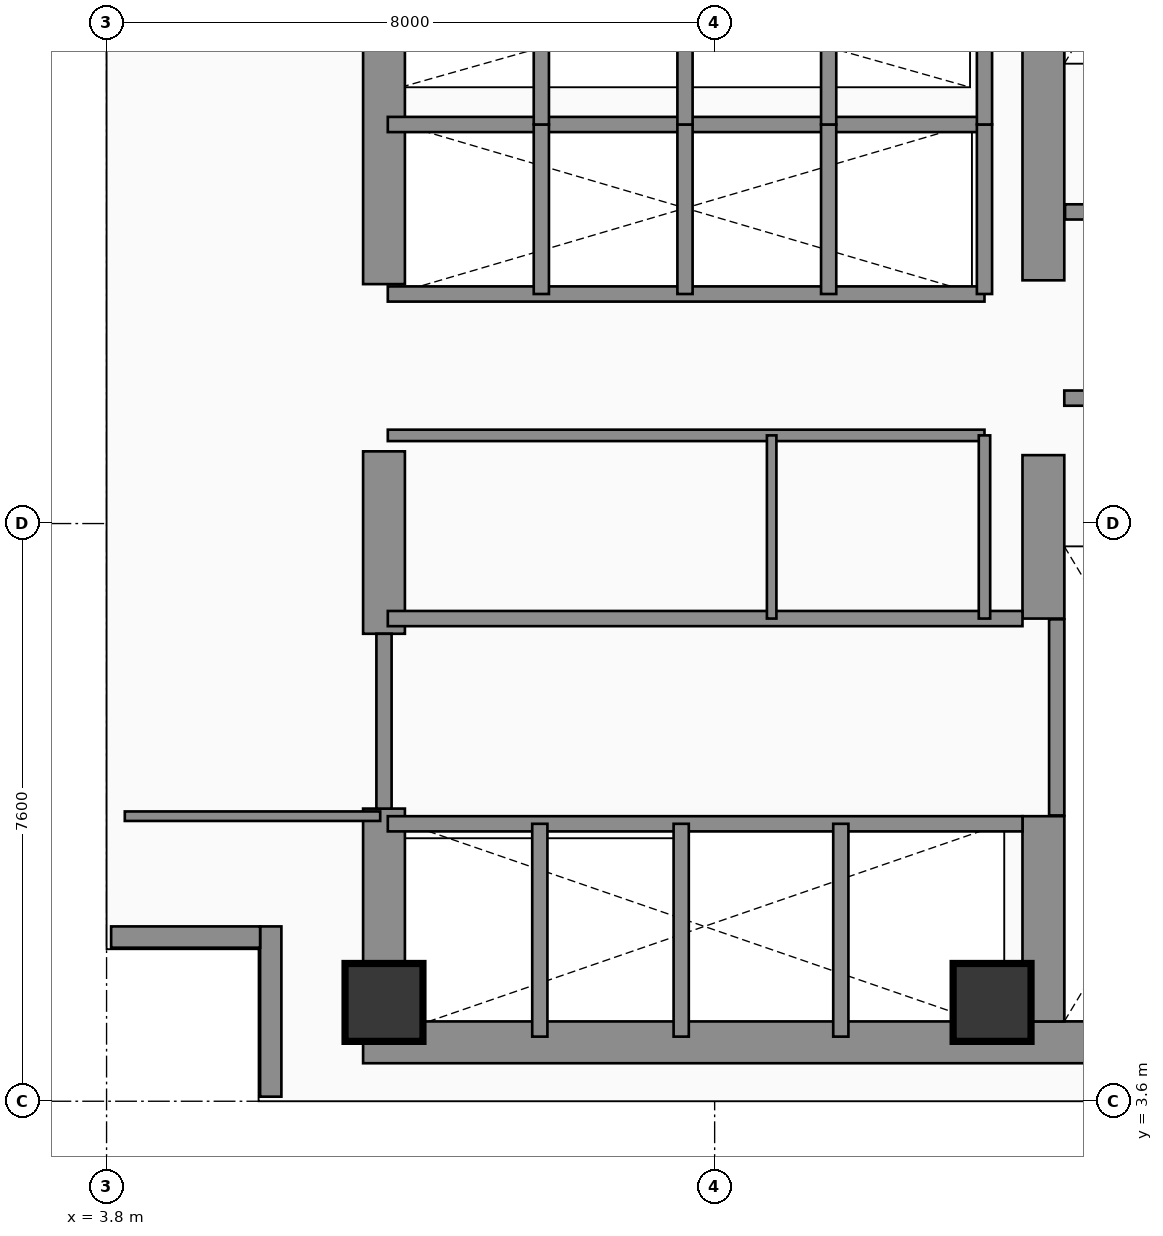
"""IFC4 building model, lengths in metres.
Left out: names, types, materials, properties, quantities, classifications, styles, units other than length and angle.
Written with IfcOpenShell. Run it as: python <this file> out.ifc"""

import sys

from ifc_helpers import new_model, si_unit, direction, frame, frame_2d, origin, origin_2d, place, context, subcontext, project, spatial, rectangle, extrude, element, fill, save


model = new_model("IFC4")
c1 = context("Model", 3, precision=1e-05, world=origin(), true_north=direction((0.0, 1.0)))
c2 = subcontext(c1, "Body", "Model", "MODEL_VIEW")
j1 = project(units=[si_unit("LENGTHUNIT", "METRE"), si_unit("PLANEANGLEUNIT", "RADIAN")], contexts=[c1])
p1 = place(None, origin())
s1 = spatial("IfcSite", under=j1, at=p1, CompositionType="ELEMENT")
p2 = place(p1, origin())
s2 = spatial("IfcBuilding", under=s1, at=p2, CompositionType="ELEMENT")
p3 = place(p2, frame((0.0, 0.0, 223.5)))
s3 = spatial("IfcBuildingStorey", under=s2, at=p3, CompositionType="ELEMENT", Elevation=223.5)
p4 = place(p3, frame((7.175, 4.375, 0.0), z_axis=(0.0, 0.0, 1.0), x_axis=(1.0, 0.0, 0.0)))
e1 = element("IfcWall", 1, at=p4, inside=s3, PredefinedType="SHEAR", context=c2, shape_type="SweptSolid", body=[
    extrude(rectangle(XDim=13.9, YDim=0.55, at=frame_2d((6.95, 0.0))), origin(), (0.0, 0.0, 1.0), 3.56),
])
p5 = place(p3, frame((7.45, 4.65, 0.0), z_axis=(0.0, 0.0, 1.0), x_axis=(0.0, 1.0, 0.0)))
e2 = element("IfcWall", 2, at=p5, inside=s3, PredefinedType="SHEAR", context=c2, shape_type="SweptSolid", body=[
    extrude(rectangle(XDim=2.8, YDim=0.55, at=frame_2d((1.4, 0.0))), origin(), (0.0, 0.0, 1.0), 3.56),
])
p6 = place(p3, frame((7.45, 9.75, 0.0), z_axis=(0.0, 0.0, 1.0), x_axis=(0.0, 1.0, 0.0)))
e3 = element("IfcWall", 3, at=p6, inside=s3, PredefinedType="SHEAR", context=c2, shape_type="SweptSolid", body=[
    extrude(rectangle(XDim=2.4, YDim=0.55, at=frame_2d((1.2, 0.0))), origin(), (0.0, 0.0, 1.0), 3.56),
])
p7 = place(p3, frame((7.45, 14.35, 0.0), z_axis=(0.0, 0.0, 1.0), x_axis=(0.0, 1.0, 0.0)))
e4 = element("IfcWall", 4, at=p7, inside=s3, PredefinedType="SHEAR", context=c2, shape_type="SweptSolid", body=[
    extrude(rectangle(XDim=4.81, YDim=0.55, at=frame_2d((2.405, 0.0))), origin(), (0.0, 0.0, 1.0), 3.56),
])
p8 = place(p3, frame((16.125, 4.65, 0.0), z_axis=(0.0, 0.0, 1.0), x_axis=(0.0, 1.0, 0.0)))
e5 = element("IfcWall", 5, at=p8, inside=s3, PredefinedType="SHEAR", context=c2, shape_type="SweptSolid", body=[
    extrude(rectangle(XDim=2.7, YDim=0.55, at=frame_2d((1.35, 0.0))), origin(), (0.0, 0.0, 1.0), 3.56),
])
p9 = place(p3, frame((16.125, 9.95, 0.0), z_axis=(0.0, 0.0, 1.0), x_axis=(0.0, 1.0, 0.0)))
e6 = element("IfcWall", 6, at=p9, inside=s3, PredefinedType="SHEAR", context=c2, shape_type="SweptSolid", body=[
    extrude(rectangle(XDim=2.15, YDim=0.55, at=frame_2d((1.075, 0.0))), origin(), (0.0, 0.0, 1.0), 3.56),
])
p10 = place(p3, frame((16.125, 14.4, 0.0), z_axis=(0.0, 0.0, 1.0), x_axis=(0.0, 1.0, 0.0)))
e7 = element("IfcWall", 7, at=p10, inside=s3, PredefinedType="SHEAR", context=c2, shape_type="SweptSolid", body=[
    extrude(rectangle(XDim=9.1, YDim=0.55, at=frame_2d((4.55, 0.0))), origin(), (0.0, 0.0, 1.0), 3.56),
])
for number, where, z_axis, x_axis in (
    (8, (7.45, 4.9, 0.0), (0.0, 0.0, 1.0), (1.0, 0.0, 0.0)),
    (9, (15.45, 4.9, 0.0), (0.0, 0.0, 1.0), (1.0, 0.0, 0.0)),
):
    element("IfcColumn", number, at=place(p3, frame(where, z_axis=z_axis, x_axis=x_axis)), inside=s3, PredefinedType="COLUMN", context=c2, shape_type="SweptSolid", body=[
        extrude(rectangle(XDim=1.0, YDim=1.0, at=origin_2d()), origin(), (0.0, 0.0, 1.0), 3.56),
    ])
p11 = place(p3, frame((5.96, 3.66, 0.0), z_axis=(0.0, 0.0, 1.0), x_axis=(0.0, 1.0, 0.0)))
e10 = element("IfcWall", 10, at=p11, inside=s3, PredefinedType="SOLIDWALL", context=c2, shape_type="SweptSolid", body=[
    extrude(rectangle(XDim=2.24, YDim=0.28, at=frame_2d((1.12, 0.0))), origin(), (0.0, 0.0, 1.0), 3.56),
])
p12 = place(p3, frame((3.86, 5.76, 0.0), z_axis=(0.0, 0.0, 1.0), x_axis=(1.0, 0.0, 0.0)))
e11 = element("IfcWall", 11, at=p12, inside=s3, PredefinedType="SOLIDWALL", context=c2, shape_type="SweptSolid", body=[
    extrude(rectangle(XDim=1.96, YDim=0.28, at=frame_2d((0.98, 0.0))), origin(), (0.0, 0.0, 1.0), 3.56),
])
p13 = place(p3, frame((16.3, 7.36, 0.0), z_axis=(0.0, 0.0, 1.0), x_axis=(0.0, 1.0, 0.0)))
e12 = element("IfcWall", 12, at=p13, inside=s3, PredefinedType="SHEAR", context=c2, shape_type="SweptSolid", body=[
    extrude(rectangle(XDim=2.58, YDim=0.2, at=frame_2d((1.29, 0.0))), origin(), (0.0, 0.0, 1.0), 3.56),
])
p14 = place(p3, frame((16.4, 12.85, 0.0), z_axis=(0.0, 0.0, 1.0), x_axis=(1.0, 0.0, 0.0)))
e13 = element("IfcWall", 13, at=p14, inside=s3, PredefinedType="PARTITIONING", context=c2, shape_type="SweptSolid", body=[
    extrude(rectangle(XDim=3.96, YDim=0.2, at=frame_2d((1.98, 0.0))), origin(), (0.0, 0.0, 1.0), 3.56),
])
p15 = place(p14, frame((1.304, 0.0, 0.0)))
e14 = element("IfcOpeningElement", 14, at=p15, cuts=e13, PredefinedType="OPENING", context=c2, shape_type="SweptSolid", body=[
    extrude(rectangle(XDim=1.1, YDim=2.2, at=frame_2d((0.55, 1.1))), frame((0.0, 0.11, 0.0), z_axis=(0.0, -1.0, 0.0), x_axis=(1.0, 0.0, 0.0)), (0.0, 0.0, 1.0), 0.22),
])
p16 = place(p3, frame((16.41, 15.3, 0.0), z_axis=(0.0, 0.0, 1.0), x_axis=(1.0, 0.0, 0.0)))
e15 = element("IfcWall", 15, at=p16, inside=s3, PredefinedType="PARTITIONING", context=c2, shape_type="SweptSolid", body=[
    extrude(rectangle(XDim=3.95, YDim=0.2, at=frame_2d((1.975, 0.0))), origin(), (0.0, 0.0, 1.0), 3.56),
])
p17 = place(p16, frame((1.294, 0.0, 0.0)))
e16 = element("IfcOpeningElement", 16, at=p17, cuts=e15, PredefinedType="OPENING", context=c2, shape_type="SweptSolid", body=[
    extrude(rectangle(XDim=1.1, YDim=2.2, at=frame_2d((0.55, 1.1))), frame((0.0, 0.11, 0.0), z_axis=(0.0, -1.0, 0.0), x_axis=(1.0, 0.0, 0.0)), (0.0, 0.0, 1.0), 0.22),
])
p18 = place(p3, frame((7.5, 7.25, 0.0), z_axis=(0.0, 0.0, 1.0), x_axis=(1.0, 0.0, 0.0)))
e17 = element("IfcWall", 17, at=p18, inside=s3, PredefinedType="PARTITIONING", context=c2, shape_type="SweptSolid", body=[
    extrude(rectangle(XDim=8.35, YDim=0.2, at=frame_2d((4.175, 0.0))), origin(), (0.0, 0.0, 1.0), 3.56),
])
p19 = place(p18, frame((0.53, 0.0, 0.0)))
e18 = element("IfcOpeningElement", 18, at=p19, cuts=e17, PredefinedType="OPENING", context=c2, shape_type="SweptSolid", body=[
    extrude(rectangle(XDim=1.1, YDim=2.2, at=frame_2d((0.55, 1.1))), frame((0.0, 0.11, 0.0), z_axis=(0.0, -1.0, 0.0), x_axis=(1.0, 0.0, 0.0)), (0.0, 0.0, 1.0), 0.22),
])
p20 = place(p18, frame((2.37, 0.0, 0.0)))
e19 = element("IfcOpeningElement", 19, at=p20, cuts=e17, PredefinedType="OPENING", context=c2, shape_type="SweptSolid", body=[
    extrude(rectangle(XDim=1.1, YDim=2.2, at=frame_2d((0.55, 1.1))), frame((0.0, 0.11, 0.0), z_axis=(0.0, -1.0, 0.0), x_axis=(1.0, 0.0, 0.0)), (0.0, 0.0, 1.0), 0.22),
])
p21 = place(p18, frame((4.33, 0.0, 0.0)))
e20 = element("IfcOpeningElement", 20, at=p21, cuts=e17, PredefinedType="OPENING", context=c2, shape_type="SweptSolid", body=[
    extrude(rectangle(XDim=1.1, YDim=2.2, at=frame_2d((0.55, 1.1))), frame((0.0, 0.11, 0.0), z_axis=(0.0, -1.0, 0.0), x_axis=(1.0, 0.0, 0.0)), (0.0, 0.0, 1.0), 0.22),
])
p22 = place(p18, frame((6.5, 0.0, 0.0)))
e21 = element("IfcOpeningElement", 21, at=p22, cuts=e17, PredefinedType="OPENING", context=c2, shape_type="SweptSolid", body=[
    extrude(rectangle(XDim=1.1, YDim=2.2, at=frame_2d((0.55, 1.1))), frame((0.0, 0.11, 0.0), z_axis=(0.0, -1.0, 0.0), x_axis=(1.0, 0.0, 0.0)), (0.0, 0.0, 1.0), 0.22),
])
p23 = place(p3, frame((7.5, 9.95, 0.0), z_axis=(0.0, 0.0, 1.0), x_axis=(1.0, 0.0, 0.0)))
e22 = element("IfcWall", 22, at=p23, inside=s3, PredefinedType="PARTITIONING", context=c2, shape_type="SweptSolid", body=[
    extrude(rectangle(XDim=8.35, YDim=0.2, at=frame_2d((4.175, 0.0))), origin(), (0.0, 0.0, 1.0), 3.56),
])
for number, where, z_axis, x_axis in (
    (23, (9.5, 4.45, 0.0), (0.0, 0.0, 1.0), (0.0, 1.0, 0.0)),
    (24, (11.36, 4.45, 0.0), (0.0, 0.0, 1.0), (0.0, 1.0, 0.0)),
    (25, (13.46, 4.45, 0.0), (0.0, 0.0, 1.0), (0.0, 1.0, 0.0)),
):
    element("IfcWall", number, at=place(p3, frame(where, z_axis=z_axis, x_axis=x_axis)), inside=s3, PredefinedType="PARTITIONING", context=c2, shape_type="SweptSolid", body=[
        extrude(rectangle(XDim=2.8, YDim=0.2, at=frame_2d((1.4, 0.0))), origin(), (0.0, 0.0, 1.0), 3.56),
    ])
p24 = place(p3, frame((7.45, 7.45, 0.0), z_axis=(0.0, 0.0, 1.0), x_axis=(0.0, 1.0, 0.0)))
e26 = element("IfcWall", 26, at=p24, inside=s3, PredefinedType="PARTITIONING", context=c2, shape_type="SweptSolid", body=[
    extrude(rectangle(XDim=2.3, YDim=0.2, at=frame_2d((1.15, 0.0))), origin(), (0.0, 0.0, 1.0), 2.54),
])
p25 = place(p24, frame((0.633, 0.0, 0.0)))
e27 = element("IfcOpeningElement", 27, at=p25, cuts=e26, PredefinedType="OPENING", context=c2, shape_type="SweptSolid", body=[
    extrude(rectangle(XDim=1.2, YDim=2.25, at=frame_2d((0.6, 1.125))), frame((0.0, 0.11, 0.0), z_axis=(0.0, -1.0, 0.0), x_axis=(1.0, 0.0, 0.0)), (0.0, 0.0, 1.0), 0.22),
])
p26 = place(p3, frame((7.5, 12.36, 0.0), z_axis=(0.0, 0.0, 1.0), x_axis=(1.0, 0.0, 0.0)))
e28 = element("IfcWall", 28, at=p26, inside=s3, PredefinedType="PARTITIONING", context=c2, shape_type="SweptSolid", body=[
    extrude(rectangle(XDim=7.85, YDim=0.15, at=frame_2d((3.925, 0.0))), origin(), (0.0, 0.0, 1.0), 3.56),
])
p27 = place(p26, frame((2.202, 0.0, 0.0)))
e29 = element("IfcOpeningElement", 29, at=p27, cuts=e28, PredefinedType="OPENING", context=c2, shape_type="SweptSolid", body=[
    extrude(rectangle(XDim=0.85, YDim=2.15, at=frame_2d((0.425, 1.075))), frame((0.0, 0.085, 0.0), z_axis=(0.0, -1.0, 0.0), x_axis=(1.0, 0.0, 0.0)), (0.0, 0.0, 1.0), 0.17),
])
p28 = place(p26, frame((6.025, 0.0, 0.0)))
e30 = element("IfcOpeningElement", 30, at=p28, cuts=e28, PredefinedType="OPENING", context=c2, shape_type="SweptSolid", body=[
    extrude(rectangle(XDim=0.85, YDim=2.15, at=frame_2d((0.425, 1.075))), frame((0.0, 0.085, 0.0), z_axis=(0.0, -1.0, 0.0), x_axis=(1.0, 0.0, 0.0)), (0.0, 0.0, 1.0), 0.17),
])
p29 = place(p3, frame((15.35, 9.95, 0.0), z_axis=(0.0, 0.0, 1.0), x_axis=(0.0, 1.0, 0.0)))
e31 = element("IfcWall", 31, at=p29, inside=s3, PredefinedType="PARTITIONING", context=c2, shape_type="SweptSolid", body=[
    extrude(rectangle(XDim=2.41, YDim=0.15, at=frame_2d((1.205, 0.0))), origin(), (0.0, 0.0, 1.0), 3.56),
])
p30 = place(p3, frame((12.55, 9.95, 0.0), z_axis=(0.0, 0.0, 1.0), x_axis=(0.0, 1.0, 0.0)))
e32 = element("IfcWall", 32, at=p30, inside=s3, PredefinedType="PARTITIONING", context=c2, shape_type="SweptSolid", body=[
    extrude(rectangle(XDim=2.41, YDim=0.125, at=frame_2d((1.205, 0.0))), origin(), (0.0, 0.0, 1.0), 3.56),
])
p31 = place(p3, frame((7.5, 14.22, 0.0), z_axis=(0.0, 0.0, 1.0), x_axis=(1.0, 0.0, 0.0)))
e33 = element("IfcWall", 33, at=p31, inside=s3, PredefinedType="PARTITIONING", context=c2, shape_type="SweptSolid", body=[
    extrude(rectangle(XDim=7.85, YDim=0.2, at=frame_2d((3.925, 0.0))), origin(), (0.0, 0.0, 1.0), 3.56),
])
p32 = place(p31, frame((0.53, 0.0, 0.0)))
e34 = element("IfcOpeningElement", 34, at=p32, cuts=e33, PredefinedType="OPENING", context=c2, shape_type="SweptSolid", body=[
    extrude(rectangle(XDim=1.1, YDim=2.2, at=frame_2d((0.55, 1.1))), frame((0.0, 0.11, 0.0), z_axis=(0.0, -1.0, 0.0), x_axis=(1.0, 0.0, 0.0)), (0.0, 0.0, 1.0), 0.22),
])
p33 = place(p31, frame((2.42, 0.0, 0.0)))
e35 = element("IfcOpeningElement", 35, at=p33, cuts=e33, PredefinedType="OPENING", context=c2, shape_type="SweptSolid", body=[
    extrude(rectangle(XDim=1.1, YDim=2.2, at=frame_2d((0.55, 1.1))), frame((0.0, 0.11, 0.0), z_axis=(0.0, -1.0, 0.0), x_axis=(1.0, 0.0, 0.0)), (0.0, 0.0, 1.0), 0.22),
])
p34 = place(p31, frame((4.31, 0.0, 0.0)))
e36 = element("IfcOpeningElement", 36, at=p34, cuts=e33, PredefinedType="OPENING", context=c2, shape_type="SweptSolid", body=[
    extrude(rectangle(XDim=1.1, YDim=2.2, at=frame_2d((0.55, 1.1))), frame((0.0, 0.11, 0.0), z_axis=(0.0, -1.0, 0.0), x_axis=(1.0, 0.0, 0.0)), (0.0, 0.0, 1.0), 0.22),
])
p35 = place(p31, frame((6.2, 0.0, 0.0)))
e37 = element("IfcOpeningElement", 37, at=p35, cuts=e33, PredefinedType="OPENING", context=c2, shape_type="SweptSolid", body=[
    extrude(rectangle(XDim=1.1, YDim=2.2, at=frame_2d((0.55, 1.1))), frame((0.0, 0.11, 0.0), z_axis=(0.0, -1.0, 0.0), x_axis=(1.0, 0.0, 0.0)), (0.0, 0.0, 1.0), 0.22),
])
p36 = place(p3, frame((7.5, 16.45, 0.0), z_axis=(0.0, 0.0, 1.0), x_axis=(1.0, 0.0, 0.0)))
e38 = element("IfcWall", 38, at=p36, inside=s3, PredefinedType="PARTITIONING", context=c2, shape_type="SweptSolid", body=[
    extrude(rectangle(XDim=7.85, YDim=0.2, at=frame_2d((3.925, 0.0))), origin(), (0.0, 0.0, 1.0), 3.56),
])
for number, where, z_axis, x_axis in (
    (39, (15.35, 14.22, 0.0), (0.0, 0.0, 1.0), (0.0, 1.0, 0.0)),
    (40, (9.52, 14.22, 0.0), (0.0, 0.0, 1.0), (0.0, 1.0, 0.0)),
    (41, (11.41, 14.22, 0.0), (0.0, 0.0, 1.0), (0.0, 1.0, 0.0)),
    (42, (13.3, 14.22, 0.0), (0.0, 0.0, 1.0), (0.0, 1.0, 0.0)),
):
    element("IfcWall", number, at=place(p3, frame(where, z_axis=z_axis, x_axis=x_axis)), inside=s3, PredefinedType="PARTITIONING", context=c2, shape_type="SweptSolid", body=[
        extrude(rectangle(XDim=2.23, YDim=0.2, at=frame_2d((1.115, 0.0))), origin(), (0.0, 0.0, 1.0), 3.56),
    ])
for number, where, z_axis, x_axis in (
    (43, (15.35, 16.45, 0.0), (0.0, 0.0, 1.0), (0.0, 1.0, 0.0)),
    (44, (9.52, 16.45, 0.0), (0.0, 0.0, 1.0), (0.0, 1.0, 0.0)),
    (45, (11.41, 16.45, 0.0), (0.0, 0.0, 1.0), (0.0, 1.0, 0.0)),
    (46, (13.3, 16.45, 0.0), (0.0, 0.0, 1.0), (0.0, 1.0, 0.0)),
):
    element("IfcWall", number, at=place(p3, frame(where, z_axis=z_axis, x_axis=x_axis)), inside=s3, PredefinedType="PARTITIONING", context=c2, shape_type="SweptSolid", body=[
        extrude(rectangle(XDim=2.67, YDim=0.2, at=frame_2d((1.335, 0.0))), origin(), (0.0, 0.0, 1.0), 3.56),
    ])
p37 = place(p3, frame((4.04, 7.35, 0.0), z_axis=(0.0, 0.0, 1.0), x_axis=(1.0, 0.0, 0.0)))
e47 = element("IfcWall", 47, at=p37, inside=s3, PredefinedType="PARTITIONING", context=c2, shape_type="SweptSolid", body=[
    extrude(rectangle(XDim=3.36, YDim=0.125, at=frame_2d((1.68, 0.0))), origin(), (0.0, 0.0, 1.0), 3.56),
])
p38 = place(p37, frame((1.687, 0.0, 0.0)))
e48 = element("IfcOpeningElement", 48, at=p38, cuts=e47, PredefinedType="OPENING", context=c2, shape_type="SweptSolid", body=[
    extrude(rectangle(XDim=0.85, YDim=2.15, at=frame_2d((0.425, 1.075))), frame((0.0, 0.073, 0.0), z_axis=(0.0, -1.0, 0.0), x_axis=(1.0, 0.0, 0.0)), (0.0, 0.0, 1.0), 0.145),
])
p39 = place(p19, origin())
e49 = element("IfcDoor", 49, at=p39, inside=s3, OperationType="SLIDING_TO_LEFT", PredefinedType="DOOR", context=c2, shape_type="SweptSolid", body=[
    extrude(rectangle(XDim=1.1, YDim=2.2, at=frame_2d((0.55, 1.1))), frame((0.0, 0.025, 0.0), z_axis=(0.0, -1.0, 0.0), x_axis=(1.0, 0.0, 0.0)), (0.0, 0.0, 1.0), 0.05),
])
fill(e18, e49)
p40 = place(p20, origin())
e50 = element("IfcDoor", 50, at=p40, inside=s3, OperationType="SLIDING_TO_LEFT", PredefinedType="DOOR", context=c2, shape_type="SweptSolid", body=[
    extrude(rectangle(XDim=1.1, YDim=2.2, at=frame_2d((0.55, 1.1))), frame((0.0, 0.025, 0.0), z_axis=(0.0, -1.0, 0.0), x_axis=(1.0, 0.0, 0.0)), (0.0, 0.0, 1.0), 0.05),
])
fill(e19, e50)
p41 = place(p21, origin())
e51 = element("IfcDoor", 51, at=p41, inside=s3, OperationType="SLIDING_TO_LEFT", PredefinedType="DOOR", context=c2, shape_type="SweptSolid", body=[
    extrude(rectangle(XDim=1.1, YDim=2.2, at=frame_2d((0.55, 1.1))), frame((0.0, 0.025, 0.0), z_axis=(0.0, -1.0, 0.0), x_axis=(1.0, 0.0, 0.0)), (0.0, 0.0, 1.0), 0.05),
])
fill(e20, e51)
p42 = place(p22, origin())
e52 = element("IfcDoor", 52, at=p42, inside=s3, OperationType="SLIDING_TO_LEFT", PredefinedType="DOOR", context=c2, shape_type="SweptSolid", body=[
    extrude(rectangle(XDim=1.1, YDim=2.2, at=frame_2d((0.55, 1.1))), frame((0.0, 0.025, 0.0), z_axis=(0.0, -1.0, 0.0), x_axis=(1.0, 0.0, 0.0)), (0.0, 0.0, 1.0), 0.05),
])
fill(e21, e52)
p43 = place(p25, frame((1.2, 0.0, 0.0), z_axis=(0.0, 0.0, 1.0), x_axis=(-1.0, 0.0, 0.0)))
e53 = element("IfcDoor", 53, at=p43, inside=s3, OperationType="SINGLE_SWING_RIGHT", PredefinedType="DOOR", context=c2, shape_type="SweptSolid", body=[
    extrude(rectangle(XDim=1.2, YDim=2.25, at=frame_2d((0.6, 1.125))), frame((0.0, 0.025, 0.0), z_axis=(0.0, -1.0, 0.0), x_axis=(1.0, 0.0, 0.0)), (0.0, 0.0, 1.0), 0.05),
])
fill(e27, e53)
p44 = place(p27, origin())
e54 = element("IfcDoor", 54, at=p44, inside=s3, OperationType="SINGLE_SWING_LEFT", PredefinedType="DOOR", context=c2, shape_type="SweptSolid", body=[
    extrude(rectangle(XDim=0.85, YDim=2.15, at=frame_2d((0.425, 1.075))), frame((0.0, 0.025, 0.0), z_axis=(0.0, -1.0, 0.0), x_axis=(1.0, 0.0, 0.0)), (0.0, 0.0, 1.0), 0.05),
])
fill(e29, e54)
p45 = place(p28, origin())
e55 = element("IfcDoor", 55, at=p45, inside=s3, OperationType="SINGLE_SWING_RIGHT", PredefinedType="DOOR", context=c2, shape_type="SweptSolid", body=[
    extrude(rectangle(XDim=0.85, YDim=2.15, at=frame_2d((0.425, 1.075))), frame((0.0, 0.025, 0.0), z_axis=(0.0, -1.0, 0.0), x_axis=(1.0, 0.0, 0.0)), (0.0, 0.0, 1.0), 0.05),
])
fill(e30, e55)
p46 = place(p32, frame((1.1, 0.0, 0.0), z_axis=(0.0, 0.0, 1.0), x_axis=(-1.0, 0.0, 0.0)))
e56 = element("IfcDoor", 56, at=p46, inside=s3, OperationType="SLIDING_TO_LEFT", PredefinedType="DOOR", context=c2, shape_type="SweptSolid", body=[
    extrude(rectangle(XDim=1.1, YDim=2.2, at=frame_2d((0.55, 1.1))), frame((0.0, 0.025, 0.0), z_axis=(0.0, -1.0, 0.0), x_axis=(1.0, 0.0, 0.0)), (0.0, 0.0, 1.0), 0.05),
])
fill(e34, e56)
p47 = place(p33, frame((1.1, 0.0, 0.0), z_axis=(0.0, 0.0, 1.0), x_axis=(-1.0, 0.0, 0.0)))
e57 = element("IfcDoor", 57, at=p47, inside=s3, OperationType="SLIDING_TO_LEFT", PredefinedType="DOOR", context=c2, shape_type="SweptSolid", body=[
    extrude(rectangle(XDim=1.1, YDim=2.2, at=frame_2d((0.55, 1.1))), frame((0.0, 0.025, 0.0), z_axis=(0.0, -1.0, 0.0), x_axis=(1.0, 0.0, 0.0)), (0.0, 0.0, 1.0), 0.05),
])
fill(e35, e57)
p48 = place(p34, frame((1.1, 0.0, 0.0), z_axis=(0.0, 0.0, 1.0), x_axis=(-1.0, 0.0, 0.0)))
e58 = element("IfcDoor", 58, at=p48, inside=s3, OperationType="SLIDING_TO_LEFT", PredefinedType="DOOR", context=c2, shape_type="SweptSolid", body=[
    extrude(rectangle(XDim=1.1, YDim=2.2, at=frame_2d((0.55, 1.1))), frame((0.0, 0.025, 0.0), z_axis=(0.0, -1.0, 0.0), x_axis=(1.0, 0.0, 0.0)), (0.0, 0.0, 1.0), 0.05),
])
fill(e36, e58)
p49 = place(p35, frame((1.1, 0.0, 0.0), z_axis=(0.0, 0.0, 1.0), x_axis=(-1.0, 0.0, 0.0)))
e59 = element("IfcDoor", 59, at=p49, inside=s3, OperationType="SLIDING_TO_LEFT", PredefinedType="DOOR", context=c2, shape_type="SweptSolid", body=[
    extrude(rectangle(XDim=1.1, YDim=2.2, at=frame_2d((0.55, 1.1))), frame((0.0, 0.025, 0.0), z_axis=(0.0, -1.0, 0.0), x_axis=(1.0, 0.0, 0.0)), (0.0, 0.0, 1.0), 0.05),
])
fill(e37, e59)
p50 = place(p38, origin())
e60 = element("IfcDoor", 60, at=p50, inside=s3, OperationType="SINGLE_SWING_RIGHT", PredefinedType="DOOR", context=c2, shape_type="SweptSolid", body=[
    extrude(rectangle(XDim=0.85, YDim=2.15, at=frame_2d((0.425, 1.075))), frame((0.0, 0.025, 0.0), z_axis=(0.0, -1.0, 0.0), x_axis=(1.0, 0.0, 0.0)), (0.0, 0.0, 1.0), 0.05),
])
fill(e48, e60)
save(model, sys.argv[1])
